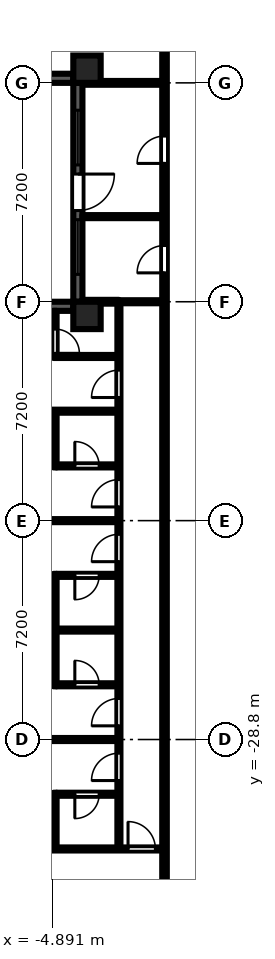
"""IFC4 building model, lengths in metres.
Left out: names, types, materials, properties, quantities, classifications, styles, units other than length and angle.
Written with IfcOpenShell. Run it as: python <this file> out.ifc"""

import sys

from ifc_helpers import new_model, si_unit, direction, frame, frame_2d, origin, origin_2d, place, context, subcontext, project, spatial, rectangle, extrude, element, fill, save


model = new_model("IFC4")
c1 = context("Model", 3, precision=1e-05, world=origin(), true_north=direction((0.0, 1.0)))
c2 = subcontext(c1, "Body", "Model", "MODEL_VIEW")
j1 = project(units=[si_unit("LENGTHUNIT", "METRE"), si_unit("PLANEANGLEUNIT", "RADIAN")], contexts=[c1])
p1 = place(None, origin())
s1 = spatial("IfcSite", under=j1, at=p1, CompositionType="ELEMENT")
p2 = place(p1, origin())
s2 = spatial("IfcBuilding", under=s1, at=p2, CompositionType="ELEMENT")
p3 = place(p2, frame((0.0, 0.0, 66.9)))
s3 = spatial("IfcBuildingStorey", under=s2, at=p3, CompositionType="ELEMENT", Elevation=66.9)
for number, where, z_axis, x_axis in (
    (1, (-3.75, -14.85, 0.0), (0.0, 0.0, 1.0), (1.0, 0.0, 0.0)),
    (2, (-3.75, -6.75, 0.0), (0.0, 0.0, 1.0), (1.0, 0.0, 0.0)),
):
    element("IfcColumn", number, at=place(p3, frame(where, z_axis=z_axis, x_axis=x_axis)), inside=s3, PredefinedType="COLUMN", context=c2, shape_type="SweptSolid", body=[
        extrude(rectangle(XDim=0.9, YDim=0.9, at=origin_2d()), origin(), (0.0, 0.0, 1.0), 3.0),
    ])
p4 = place(p3, frame((-7.2, -7.05, 0.0), z_axis=(0.0, 0.0, 1.0), x_axis=(1.0, 0.0, 0.0)))
e3 = element("IfcWall", 3, at=p4, inside=s3, PredefinedType="SOLIDWALL", context=c2, shape_type="SweptSolid", body=[
    extrude(rectangle(XDim=3.0, YDim=0.3, at=frame_2d((1.5, 0.0))), origin(), (0.0, 0.0, 1.0), 2.1),
])
p5 = place(p3, frame((-4.05, -7.2, 0.0), z_axis=(0.0, 0.0, 1.0), x_axis=(0.0, -1.0, 0.0)))
e4 = element("IfcWall", 4, at=p5, inside=s3, PredefinedType="SOLIDWALL", context=c2, shape_type="SweptSolid", body=[
    extrude(rectangle(XDim=7.2, YDim=0.3, at=frame_2d((3.6, 0.0))), origin(), (0.0, 0.0, 1.0), 2.1),
])
p6 = place(p5, frame((3.0, 0.0, 0.0)))
e5 = element("IfcOpeningElement", 5, at=p6, cuts=e4, PredefinedType="OPENING", context=c2, shape_type="SweptSolid", body=[
    extrude(rectangle(XDim=1.2, YDim=2.05, at=frame_2d((0.6, 1.025))), frame((0.0, 0.16, 0.0), z_axis=(0.0, -1.0, 0.0), x_axis=(1.0, 0.0, 0.0)), (0.0, 0.0, 1.0), 0.32),
])
p7 = place(p5, frame((0.9, 0.0, 0.2)))
e6 = element("IfcOpeningElement", 6, at=p7, cuts=e4, PredefinedType="OPENING", context=c2, shape_type="SweptSolid", body=[
    extrude(rectangle(XDim=1.8, YDim=1.85, at=frame_2d((0.9, 0.925))), frame((0.0, 0.16, 0.0), z_axis=(0.0, -1.0, 0.0), x_axis=(1.0, 0.0, 0.0)), (0.0, 0.0, 1.0), 0.32),
])
p8 = place(p5, frame((4.5, 0.0, 0.2)))
e7 = element("IfcOpeningElement", 7, at=p8, cuts=e4, PredefinedType="OPENING", context=c2, shape_type="SweptSolid", body=[
    extrude(rectangle(XDim=1.8, YDim=1.85, at=frame_2d((0.9, 0.925))), frame((0.0, 0.16, 0.0), z_axis=(0.0, -1.0, 0.0), x_axis=(1.0, 0.0, 0.0)), (0.0, 0.0, 1.0), 0.32),
])
p9 = place(p3, frame((-4.2, -14.55, 0.0), z_axis=(0.0, 0.0, 1.0), x_axis=(-1.0, 0.0, 0.0)))
e8 = element("IfcWall", 8, at=p9, inside=s3, PredefinedType="SOLIDWALL", context=c2, shape_type="SweptSolid", body=[
    extrude(rectangle(XDim=2.1, YDim=0.3, at=frame_2d((1.05, 0.0))), origin(), (0.0, 0.0, 1.0), 2.1),
])
p10 = place(p3, frame((-6.9, -32.4, 0.0), z_axis=(0.0, 0.0, 1.0), x_axis=(1.0, 0.0, 0.0)))
e9 = element("IfcWall", 9, at=p10, inside=s3, PredefinedType="PARTITIONING", context=c2, shape_type="SweptSolid", body=[
    extrude(rectangle(XDim=5.625, YDim=0.1, at=frame_2d((2.812, 0.0))), origin(), (0.0, 0.0, 1.0), 2.575),
])
p11 = place(p10, frame((4.5, 0.0, 0.0)))
e10 = element("IfcOpeningElement", 10, at=p11, cuts=e9, PredefinedType="OPENING", context=c2, shape_type="SweptSolid", body=[
    extrude(rectangle(XDim=0.9, YDim=2.1, at=frame_2d((0.45, 1.05))), frame((0.0, 0.06, 0.0), z_axis=(0.0, -1.0, 0.0), x_axis=(1.0, 0.0, 0.0)), (0.0, 0.0, 1.0), 0.12),
])
for number, where, z_axis, x_axis in (
    (11, (-6.9, -28.8, 0.0), (0.0, 0.0, 1.0), (1.0, 0.0, 0.0)),
    (12, (-6.9, -25.2, 0.0), (0.0, 0.0, 1.0), (1.0, 0.0, 0.0)),
    (13, (-6.9, -21.6, 0.0), (0.0, 0.0, 1.0), (1.0, 0.0, 0.0)),
    (14, (-6.9, -18.0, 0.0), (0.0, 0.0, 1.0), (1.0, 0.0, 0.0)),
):
    element("IfcWall", number, at=place(p3, frame(where, z_axis=z_axis, x_axis=x_axis)), inside=s3, PredefinedType="PARTITIONING", context=c2, shape_type="SweptSolid", body=[
        extrude(rectangle(XDim=4.15, YDim=0.1, at=frame_2d((2.075, 0.0))), origin(), (0.0, 0.0, 1.0), 2.575),
    ])
p12 = place(p3, frame((-4.8, -32.35, 0.0), z_axis=(0.0, 0.0, 1.0), x_axis=(0.0, 1.0, 0.0)))
e15 = element("IfcWall", 15, at=p12, inside=s3, PredefinedType="PARTITIONING", context=c2, shape_type="SweptSolid", body=[
    extrude(rectangle(XDim=1.8, YDim=0.1, at=frame_2d((0.9, 0.0))), origin(), (0.0, 0.0, 1.0), 2.575),
])
p13 = place(p3, frame((-4.75, -30.6, 0.0), z_axis=(0.0, 0.0, 1.0), x_axis=(1.0, 0.0, 0.0)))
e16 = element("IfcWall", 16, at=p13, inside=s3, PredefinedType="PARTITIONING", context=c2, shape_type="SweptSolid", body=[
    extrude(rectangle(XDim=2.0, YDim=0.1, at=frame_2d((1.0, 0.0))), origin(), (0.0, 0.0, 1.0), 2.575),
])
p14 = place(p13, frame((0.6, 0.0, 0.0)))
e17 = element("IfcOpeningElement", 17, at=p14, cuts=e16, PredefinedType="OPENING", context=c2, shape_type="SweptSolid", body=[
    extrude(rectangle(XDim=0.8, YDim=2.1, at=frame_2d((0.4, 1.05))), frame((0.0, 0.06, 0.0), z_axis=(0.0, -1.0, 0.0), x_axis=(1.0, 0.0, 0.0)), (0.0, 0.0, 1.0), 0.12),
])
p15 = place(p3, frame((-4.8, -27.05, 0.0), z_axis=(0.0, 0.0, 1.0), x_axis=(0.0, 1.0, 0.0)))
e18 = element("IfcWall", 18, at=p15, inside=s3, PredefinedType="PARTITIONING", context=c2, shape_type="SweptSolid", body=[
    extrude(rectangle(XDim=3.7, YDim=0.1, at=frame_2d((1.85, 0.0))), origin(), (0.0, 0.0, 1.0), 2.575),
])
p16 = place(p3, frame((-4.75, -27.0, 0.0), z_axis=(0.0, 0.0, 1.0), x_axis=(1.0, 0.0, 0.0)))
e19 = element("IfcWall", 19, at=p16, inside=s3, PredefinedType="PARTITIONING", context=c2, shape_type="SweptSolid", body=[
    extrude(rectangle(XDim=2.0, YDim=0.1, at=frame_2d((1.0, 0.0))), origin(), (0.0, 0.0, 1.0), 2.575),
])
p17 = place(p16, frame((0.6, 0.0, 0.0)))
e20 = element("IfcOpeningElement", 20, at=p17, cuts=e19, PredefinedType="OPENING", context=c2, shape_type="SweptSolid", body=[
    extrude(rectangle(XDim=0.8, YDim=2.1, at=frame_2d((0.4, 1.05))), frame((0.0, 0.06, 0.0), z_axis=(0.0, -1.0, 0.0), x_axis=(1.0, 0.0, 0.0)), (0.0, 0.0, 1.0), 0.12),
])
p18 = place(p3, frame((-4.75, -23.4, 0.0), z_axis=(0.0, 0.0, 1.0), x_axis=(1.0, 0.0, 0.0)))
e21 = element("IfcWall", 21, at=p18, inside=s3, PredefinedType="PARTITIONING", context=c2, shape_type="SweptSolid", body=[
    extrude(rectangle(XDim=2.0, YDim=0.1, at=frame_2d((1.0, 0.0))), origin(), (0.0, 0.0, 1.0), 2.575),
])
p19 = place(p18, frame((0.6, 0.0, 0.0)))
e22 = element("IfcOpeningElement", 22, at=p19, cuts=e21, PredefinedType="OPENING", context=c2, shape_type="SweptSolid", body=[
    extrude(rectangle(XDim=0.8, YDim=2.1, at=frame_2d((0.4, 1.05))), frame((0.0, 0.06, 0.0), z_axis=(0.0, -1.0, 0.0), x_axis=(1.0, 0.0, 0.0)), (0.0, 0.0, 1.0), 0.12),
])
p20 = place(p3, frame((-4.8, -19.85, 0.0), z_axis=(0.0, 0.0, 1.0), x_axis=(0.0, 1.0, 0.0)))
e23 = element("IfcWall", 23, at=p20, inside=s3, PredefinedType="PARTITIONING", context=c2, shape_type="SweptSolid", body=[
    extrude(rectangle(XDim=1.8, YDim=0.1, at=frame_2d((0.9, 0.0))), origin(), (0.0, 0.0, 1.0), 2.575),
])
p21 = place(p3, frame((-4.75, -19.8, 0.0), z_axis=(0.0, 0.0, 1.0), x_axis=(1.0, 0.0, 0.0)))
e24 = element("IfcWall", 24, at=p21, inside=s3, PredefinedType="PARTITIONING", context=c2, shape_type="SweptSolid", body=[
    extrude(rectangle(XDim=2.0, YDim=0.1, at=frame_2d((1.0, 0.0))), origin(), (0.0, 0.0, 1.0), 2.575),
])
p22 = place(p21, frame((0.6, 0.0, 0.0)))
e25 = element("IfcOpeningElement", 25, at=p22, cuts=e24, PredefinedType="OPENING", context=c2, shape_type="SweptSolid", body=[
    extrude(rectangle(XDim=0.8, YDim=2.1, at=frame_2d((0.4, 1.05))), frame((0.0, 0.06, 0.0), z_axis=(0.0, -1.0, 0.0), x_axis=(1.0, 0.0, 0.0)), (0.0, 0.0, 1.0), 0.12),
])
p23 = place(p3, frame((-4.8, -16.25, 0.0), z_axis=(0.0, 0.0, 1.0), x_axis=(0.0, 1.0, 0.0)))
e26 = element("IfcWall", 26, at=p23, inside=s3, PredefinedType="PARTITIONING", context=c2, shape_type="SweptSolid", body=[
    extrude(rectangle(XDim=1.55, YDim=0.1, at=frame_2d((0.775, 0.0))), origin(), (0.0, 0.0, 1.0), 2.575),
])
p24 = place(p23, frame((0.15, 0.0, 0.0)))
e27 = element("IfcOpeningElement", 27, at=p24, cuts=e26, PredefinedType="OPENING", context=c2, shape_type="SweptSolid", body=[
    extrude(rectangle(XDim=0.8, YDim=2.1, at=frame_2d((0.4, 1.05))), frame((0.0, 0.06, 0.0), z_axis=(0.0, -1.0, 0.0), x_axis=(1.0, 0.0, 0.0)), (0.0, 0.0, 1.0), 0.12),
])
p25 = place(p3, frame((-4.75, -16.2, 0.0), z_axis=(0.0, 0.0, 1.0), x_axis=(1.0, 0.0, 0.0)))
e28 = element("IfcWall", 28, at=p25, inside=s3, PredefinedType="PARTITIONING", context=c2, shape_type="SweptSolid", body=[
    extrude(rectangle(XDim=2.0, YDim=0.1, at=frame_2d((1.0, 0.0))), origin(), (0.0, 0.0, 1.0), 2.575),
])
p26 = place(p3, frame((-3.9, -14.4, 0.0), z_axis=(0.0, 0.0, 1.0), x_axis=(1.0, 0.0, 0.0)))
e29 = element("IfcWall", 29, at=p26, inside=s3, PredefinedType="PARTITIONING", context=c2, shape_type="SweptSolid", body=[
    extrude(rectangle(XDim=1.2, YDim=0.125, at=frame_2d((0.6, 0.0))), origin(), (0.0, 0.0, 1.0), 2.575),
])
p27 = place(p3, frame((-3.9, -11.6, 0.0), z_axis=(0.0, 0.0, 1.0), x_axis=(1.0, 0.0, 0.0)))
e30 = element("IfcWall", 30, at=p27, inside=s3, PredefinedType="PARTITIONING", context=c2, shape_type="SweptSolid", body=[
    extrude(rectangle(XDim=2.625, YDim=0.1, at=frame_2d((1.312, 0.0))), origin(), (0.0, 0.0, 1.0), 2.575),
])
p28 = place(p3, frame((-3.9, -7.2, 0.0), z_axis=(0.0, 0.0, 1.0), x_axis=(1.0, 0.0, 0.0)))
e31 = element("IfcWall", 31, at=p28, inside=s3, PredefinedType="PARTITIONING", context=c2, shape_type="SweptSolid", body=[
    extrude(rectangle(XDim=2.625, YDim=0.125, at=frame_2d((1.312, 0.0))), origin(), (0.0, 0.0, 1.0), 2.575),
])
p29 = place(p3, frame((-2.7, -32.35, 0.0), z_axis=(0.0, 0.0, 1.0), x_axis=(0.0, 1.0, 0.0)))
e32 = element("IfcWall", 32, at=p29, inside=s3, PredefinedType="PARTITIONING", context=c2, shape_type="SweptSolid", body=[
    extrude(rectangle(XDim=17.888, YDim=0.1, at=frame_2d((8.944, 0.0))), origin(), (0.0, 0.0, 1.0), 2.575),
])
p30 = place(p29, frame((2.2, 0.0, 0.0)))
e33 = element("IfcOpeningElement", 33, at=p30, cuts=e32, PredefinedType="OPENING", context=c2, shape_type="SweptSolid", body=[
    extrude(rectangle(XDim=0.9, YDim=2.1, at=frame_2d((0.45, 1.05))), frame((0.0, 0.06, 0.0), z_axis=(0.0, -1.0, 0.0), x_axis=(1.0, 0.0, 0.0)), (0.0, 0.0, 1.0), 0.12),
])
p31 = place(p29, frame((4.0, 0.0, 0.0)))
e34 = element("IfcOpeningElement", 34, at=p31, cuts=e32, PredefinedType="OPENING", context=c2, shape_type="SweptSolid", body=[
    extrude(rectangle(XDim=0.9, YDim=2.1, at=frame_2d((0.45, 1.05))), frame((0.0, 0.06, 0.0), z_axis=(0.0, -1.0, 0.0), x_axis=(1.0, 0.0, 0.0)), (0.0, 0.0, 1.0), 0.12),
])
p32 = place(p29, frame((9.4, 0.0, 0.0)))
e35 = element("IfcOpeningElement", 35, at=p32, cuts=e32, PredefinedType="OPENING", context=c2, shape_type="SweptSolid", body=[
    extrude(rectangle(XDim=0.9, YDim=2.1, at=frame_2d((0.45, 1.05))), frame((0.0, 0.06, 0.0), z_axis=(0.0, -1.0, 0.0), x_axis=(1.0, 0.0, 0.0)), (0.0, 0.0, 1.0), 0.12),
])
p33 = place(p29, frame((11.2, 0.0, 0.0)))
e36 = element("IfcOpeningElement", 36, at=p33, cuts=e32, PredefinedType="OPENING", context=c2, shape_type="SweptSolid", body=[
    extrude(rectangle(XDim=0.9, YDim=2.1, at=frame_2d((0.45, 1.05))), frame((0.0, 0.06, 0.0), z_axis=(0.0, -1.0, 0.0), x_axis=(1.0, 0.0, 0.0)), (0.0, 0.0, 1.0), 0.12),
])
p34 = place(p29, frame((14.8, 0.0, 0.0)))
e37 = element("IfcOpeningElement", 37, at=p34, cuts=e32, PredefinedType="OPENING", context=c2, shape_type="SweptSolid", body=[
    extrude(rectangle(XDim=0.9, YDim=2.1, at=frame_2d((0.45, 1.05))), frame((0.0, 0.06, 0.0), z_axis=(0.0, -1.0, 0.0), x_axis=(1.0, 0.0, 0.0)), (0.0, 0.0, 1.0), 0.12),
])
p35 = place(p3, frame((-2.7, -14.4, 0.0), z_axis=(0.0, 0.0, 1.0), x_axis=(1.0, 0.0, 0.0)))
e38 = element("IfcWall", 38, at=p35, inside=s3, PredefinedType="PARTITIONING", context=c2, shape_type="SweptSolid", body=[
    extrude(rectangle(XDim=1.425, YDim=0.1, at=frame_2d((0.712, 0.0))), origin(), (0.0, 0.0, 1.0), 2.575),
])
p36 = place(p3, frame((-1.2, -36.5, 0.0), z_axis=(0.0, 0.0, 1.0), x_axis=(0.0, 1.0, 0.0)))
e39 = element("IfcWall", 39, at=p36, inside=s3, PredefinedType="PARTITIONING", context=c2, shape_type="SweptSolid", body=[
    extrude(rectangle(XDim=35.225, YDim=0.15, at=frame_2d((17.613, 0.0))), origin(), (0.0, 0.0, 1.0), 2.575),
])
p37 = place(p36, frame((31.85, 0.0, 0.0)))
e40 = element("IfcOpeningElement", 40, at=p37, cuts=e39, PredefinedType="OPENING", context=c2, shape_type="SweptSolid", body=[
    extrude(rectangle(XDim=0.9, YDim=2.1, at=frame_2d((0.45, 1.05))), frame((0.0, 0.085, 0.0), z_axis=(0.0, -1.0, 0.0), x_axis=(1.0, 0.0, 0.0)), (0.0, 0.0, 1.0), 0.17),
])
p38 = place(p36, frame((23.05, 0.0, 0.0)))
e41 = element("IfcOpeningElement", 41, at=p38, cuts=e39, PredefinedType="OPENING", context=c2, shape_type="SweptSolid", body=[
    extrude(rectangle(XDim=0.9, YDim=2.1, at=frame_2d((0.45, 1.05))), frame((0.0, 0.085, 0.0), z_axis=(0.0, -1.0, 0.0), x_axis=(1.0, 0.0, 0.0)), (0.0, 0.0, 1.0), 0.17),
])
p39 = place(p36, frame((26.65, 0.0, 0.0)))
e42 = element("IfcOpeningElement", 42, at=p39, cuts=e39, PredefinedType="OPENING", context=c2, shape_type="SweptSolid", body=[
    extrude(rectangle(XDim=0.9, YDim=2.1, at=frame_2d((0.45, 1.05))), frame((0.0, 0.085, 0.0), z_axis=(0.0, -1.0, 0.0), x_axis=(1.0, 0.0, 0.0)), (0.0, 0.0, 1.0), 0.17),
])
p40 = place(p36, frame((1.55, 0.0, 0.0)))
e43 = element("IfcOpeningElement", 43, at=p40, cuts=e39, PredefinedType="OPENING", context=c2, shape_type="SweptSolid", body=[
    extrude(rectangle(XDim=1.0, YDim=2.1, at=frame_2d((0.5, 1.05))), frame((0.0, 0.085, 0.0), z_axis=(0.0, -1.0, 0.0), x_axis=(1.0, 0.0, 0.0)), (0.0, 0.0, 1.0), 0.17),
])
p41 = place(p6, origin())
e44 = element("IfcDoor", 44, at=p41, inside=s3, OperationType="SINGLE_SWING_LEFT", PredefinedType="DOOR", context=c2, shape_type="SweptSolid", body=[
    extrude(rectangle(XDim=1.2, YDim=2.05, at=frame_2d((0.6, 1.025))), frame((0.0, 0.025, 0.0), z_axis=(0.0, -1.0, 0.0), x_axis=(1.0, 0.0, 0.0)), (0.0, 0.0, 1.0), 0.05),
])
fill(e5, e44)
p42 = place(p7, origin())
e45 = element("IfcWindow", 45, at=p42, inside=s3, PartitioningType="SINGLE_PANEL", PredefinedType="WINDOW", context=c2, shape_type="SweptSolid", body=[
    extrude(rectangle(XDim=1.8, YDim=1.85, at=frame_2d((0.9, 0.925))), frame((0.0, 0.03, 0.0), z_axis=(0.0, -1.0, 0.0), x_axis=(1.0, 0.0, 0.0)), (0.0, 0.0, 1.0), 0.06),
])
fill(e6, e45)
p43 = place(p8, origin())
e46 = element("IfcWindow", 46, at=p43, inside=s3, PartitioningType="SINGLE_PANEL", PredefinedType="WINDOW", context=c2, shape_type="SweptSolid", body=[
    extrude(rectangle(XDim=1.8, YDim=1.85, at=frame_2d((0.9, 0.925))), frame((0.0, 0.03, 0.0), z_axis=(0.0, -1.0, 0.0), x_axis=(1.0, 0.0, 0.0)), (0.0, 0.0, 1.0), 0.06),
])
fill(e7, e46)
p44 = place(p38, origin())
e47 = element("IfcDoor", 47, at=p44, inside=s3, OperationType="SINGLE_SWING_LEFT", PredefinedType="DOOR", context=c2, shape_type="SweptSolid", body=[
    extrude(rectangle(XDim=0.9, YDim=2.1, at=frame_2d((0.45, 1.05))), frame((0.0, 0.025, 0.0), z_axis=(0.0, -1.0, 0.0), x_axis=(1.0, 0.0, 0.0)), (0.0, 0.0, 1.0), 0.05),
])
fill(e41, e47)
p45 = place(p39, origin())
e48 = element("IfcDoor", 48, at=p45, inside=s3, OperationType="SINGLE_SWING_LEFT", PredefinedType="DOOR", context=c2, shape_type="SweptSolid", body=[
    extrude(rectangle(XDim=0.9, YDim=2.1, at=frame_2d((0.45, 1.05))), frame((0.0, 0.025, 0.0), z_axis=(0.0, -1.0, 0.0), x_axis=(1.0, 0.0, 0.0)), (0.0, 0.0, 1.0), 0.05),
])
fill(e42, e48)
p46 = place(p30, origin())
e49 = element("IfcDoor", 49, at=p46, inside=s3, OperationType="SINGLE_SWING_LEFT", PredefinedType="DOOR", context=c2, shape_type="SweptSolid", body=[
    extrude(rectangle(XDim=0.9, YDim=2.1, at=frame_2d((0.45, 1.05))), frame((0.0, 0.025, 0.0), z_axis=(0.0, -1.0, 0.0), x_axis=(1.0, 0.0, 0.0)), (0.0, 0.0, 1.0), 0.05),
])
fill(e33, e49)
p47 = place(p31, origin())
e50 = element("IfcDoor", 50, at=p47, inside=s3, OperationType="SINGLE_SWING_LEFT", PredefinedType="DOOR", context=c2, shape_type="SweptSolid", body=[
    extrude(rectangle(XDim=0.9, YDim=2.1, at=frame_2d((0.45, 1.05))), frame((0.0, 0.025, 0.0), z_axis=(0.0, -1.0, 0.0), x_axis=(1.0, 0.0, 0.0)), (0.0, 0.0, 1.0), 0.05),
])
fill(e34, e50)
p48 = place(p32, origin())
e51 = element("IfcDoor", 51, at=p48, inside=s3, OperationType="SINGLE_SWING_LEFT", PredefinedType="DOOR", context=c2, shape_type="SweptSolid", body=[
    extrude(rectangle(XDim=0.9, YDim=2.1, at=frame_2d((0.45, 1.05))), frame((0.0, 0.025, 0.0), z_axis=(0.0, -1.0, 0.0), x_axis=(1.0, 0.0, 0.0)), (0.0, 0.0, 1.0), 0.05),
])
fill(e35, e51)
p49 = place(p33, origin())
e52 = element("IfcDoor", 52, at=p49, inside=s3, OperationType="SINGLE_SWING_LEFT", PredefinedType="DOOR", context=c2, shape_type="SweptSolid", body=[
    extrude(rectangle(XDim=0.9, YDim=2.1, at=frame_2d((0.45, 1.05))), frame((0.0, 0.025, 0.0), z_axis=(0.0, -1.0, 0.0), x_axis=(1.0, 0.0, 0.0)), (0.0, 0.0, 1.0), 0.05),
])
fill(e36, e52)
p50 = place(p34, origin())
e53 = element("IfcDoor", 53, at=p50, inside=s3, OperationType="SINGLE_SWING_LEFT", PredefinedType="DOOR", context=c2, shape_type="SweptSolid", body=[
    extrude(rectangle(XDim=0.9, YDim=2.1, at=frame_2d((0.45, 1.05))), frame((0.0, 0.025, 0.0), z_axis=(0.0, -1.0, 0.0), x_axis=(1.0, 0.0, 0.0)), (0.0, 0.0, 1.0), 0.05),
])
fill(e37, e53)
p51 = place(p11, origin())
e54 = element("IfcDoor", 54, at=p51, inside=s3, OperationType="SINGLE_SWING_LEFT", PredefinedType="DOOR", context=c2, shape_type="SweptSolid", body=[
    extrude(rectangle(XDim=0.9, YDim=2.1, at=frame_2d((0.45, 1.05))), frame((0.0, 0.025, 0.0), z_axis=(0.0, -1.0, 0.0), x_axis=(1.0, 0.0, 0.0)), (0.0, 0.0, 1.0), 0.05),
])
fill(e10, e54)
p52 = place(p24, frame((0.8, 0.0, 0.0), z_axis=(0.0, 0.0, 1.0), x_axis=(-1.0, 0.0, 0.0)))
e55 = element("IfcDoor", 55, at=p52, inside=s3, OperationType="SINGLE_SWING_RIGHT", PredefinedType="DOOR", context=c2, shape_type="SweptSolid", body=[
    extrude(rectangle(XDim=0.8, YDim=2.1, at=frame_2d((0.4, 1.05))), frame((0.0, 0.025, 0.0), z_axis=(0.0, -1.0, 0.0), x_axis=(1.0, 0.0, 0.0)), (0.0, 0.0, 1.0), 0.05),
])
fill(e27, e55)
p53 = place(p22, origin())
e56 = element("IfcDoor", 56, at=p53, inside=s3, OperationType="SINGLE_SWING_LEFT", PredefinedType="DOOR", context=c2, shape_type="SweptSolid", body=[
    extrude(rectangle(XDim=0.8, YDim=2.1, at=frame_2d((0.4, 1.05))), frame((0.0, 0.025, 0.0), z_axis=(0.0, -1.0, 0.0), x_axis=(1.0, 0.0, 0.0)), (0.0, 0.0, 1.0), 0.05),
])
fill(e25, e56)
p54 = place(p19, frame((0.8, 0.0, 0.0), z_axis=(0.0, 0.0, 1.0), x_axis=(-1.0, 0.0, 0.0)))
e57 = element("IfcDoor", 57, at=p54, inside=s3, OperationType="SINGLE_SWING_RIGHT", PredefinedType="DOOR", context=c2, shape_type="SweptSolid", body=[
    extrude(rectangle(XDim=0.8, YDim=2.1, at=frame_2d((0.4, 1.05))), frame((0.0, 0.025, 0.0), z_axis=(0.0, -1.0, 0.0), x_axis=(1.0, 0.0, 0.0)), (0.0, 0.0, 1.0), 0.05),
])
fill(e22, e57)
p55 = place(p17, origin())
e58 = element("IfcDoor", 58, at=p55, inside=s3, OperationType="SINGLE_SWING_LEFT", PredefinedType="DOOR", context=c2, shape_type="SweptSolid", body=[
    extrude(rectangle(XDim=0.8, YDim=2.1, at=frame_2d((0.4, 1.05))), frame((0.0, 0.025, 0.0), z_axis=(0.0, -1.0, 0.0), x_axis=(1.0, 0.0, 0.0)), (0.0, 0.0, 1.0), 0.05),
])
fill(e20, e58)
p56 = place(p14, frame((0.8, 0.0, 0.0), z_axis=(0.0, 0.0, 1.0), x_axis=(-1.0, 0.0, 0.0)))
e59 = element("IfcDoor", 59, at=p56, inside=s3, OperationType="SINGLE_SWING_RIGHT", PredefinedType="DOOR", context=c2, shape_type="SweptSolid", body=[
    extrude(rectangle(XDim=0.8, YDim=2.1, at=frame_2d((0.4, 1.05))), frame((0.0, 0.025, 0.0), z_axis=(0.0, -1.0, 0.0), x_axis=(1.0, 0.0, 0.0)), (0.0, 0.0, 1.0), 0.05),
])
fill(e17, e59)
save(model, sys.argv[1])
